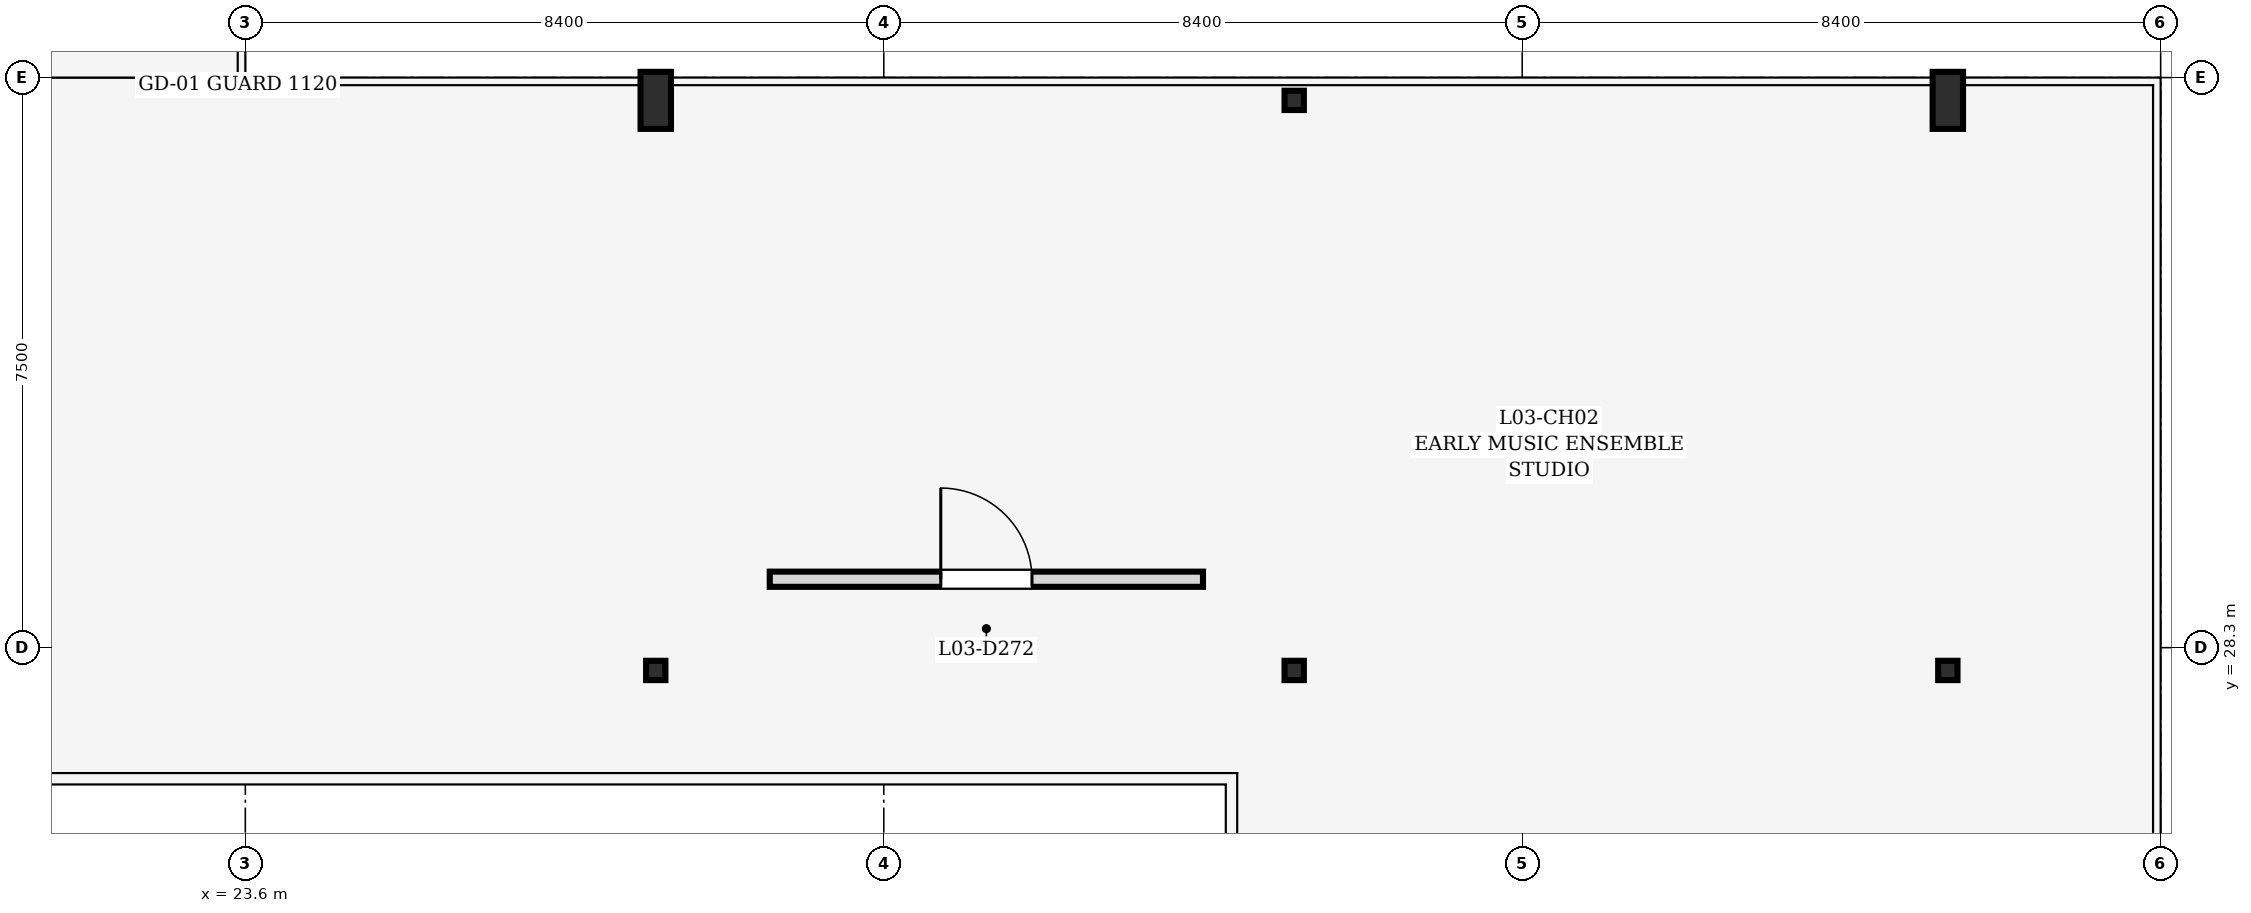
"""IFC4 building model, lengths in metres.
Left out: names, types, materials, properties, quantities, classifications, styles, units other than length and angle.
Written with IfcOpenShell. Run it as: python <this file> out.ifc"""

import sys

from ifc_helpers import new_model, si_unit, direction, frame, frame_2d, origin, origin_2d, place, context, subcontext, project, spatial, rectangle, i_section, extrude, element, fill, save


model = new_model("IFC4")
c1 = context("Model", 3, precision=1e-05, world=origin(), true_north=direction((0.0, 1.0)))
c2 = subcontext(c1, "Body", "Model", "MODEL_VIEW")
j1 = project(units=[si_unit("LENGTHUNIT", "METRE"), si_unit("PLANEANGLEUNIT", "RADIAN")], contexts=[c1])
p1 = place(None, origin())
s1 = spatial("IfcSite", under=j1, at=p1, CompositionType="ELEMENT")
p2 = place(p1, origin())
s2 = spatial("IfcBuilding", under=s1, at=p2, CompositionType="ELEMENT")
p3 = place(p2, frame((0.0, 0.0, 10.2)))
s3 = spatial("IfcBuildingStorey", under=s2, at=p3, CompositionType="ELEMENT", Elevation=10.2)
p4 = place(p3, frame((29.0, 28.0, 0.0), z_axis=(0.0, 0.0, 1.0), x_axis=(1.0, 0.0, 0.0)))
e1 = element("IfcColumn", 1, at=p4, inside=s3, PredefinedType="COLUMN", context=c2, shape_type="SweptSolid", body=[
    extrude(i_section(OverallWidth=0.254, OverallDepth=0.254, WebThickness=0.009, FlangeThickness=0.014, at=origin_2d()), origin(), (0.0, 0.0, 1.0), 4.5),
])
p5 = place(p3, frame((29.0, 35.5, 0.0), z_axis=(0.0, 0.0, 1.0), x_axis=(1.0, 0.0, 0.0)))
e2 = element("IfcColumn", 2, at=p5, inside=s3, PredefinedType="PILASTER", context=c2, shape_type="SweptSolid", body=[
    extrude(rectangle(XDim=0.4, YDim=0.75, at=origin_2d()), origin(), (0.0, 0.0, 1.0), 4.5),
])
for number, where, z_axis, x_axis in (
    (3, (37.4, 28.0, 0.0), (0.0, 0.0, 1.0), (1.0, 0.0, 0.0)),
    (4, (37.4, 35.5, 0.0), (0.0, 0.0, 1.0), (1.0, 0.0, 0.0)),
    (5, (46.0, 28.0, 0.0), (0.0, 0.0, 1.0), (1.0, 0.0, 0.0)),
):
    element("IfcColumn", number, at=place(p3, frame(where, z_axis=z_axis, x_axis=x_axis)), inside=s3, PredefinedType="COLUMN", context=c2, shape_type="SweptSolid", body=[
        extrude(i_section(OverallWidth=0.254, OverallDepth=0.254, WebThickness=0.009, FlangeThickness=0.014, at=origin_2d()), origin(), (0.0, 0.0, 1.0), 4.5),
    ])
p6 = place(p3, frame((46.0, 35.5, 0.0), z_axis=(0.0, 0.0, 1.0), x_axis=(1.0, 0.0, 0.0)))
e6 = element("IfcColumn", 6, at=p6, inside=s3, PredefinedType="PILASTER", context=c2, shape_type="SweptSolid", body=[
    extrude(rectangle(XDim=0.4, YDim=0.75, at=origin_2d()), origin(), (0.0, 0.0, 1.0), 4.5),
])
p7 = place(p3, frame((30.5, 29.2, 0.0), z_axis=(0.0, 0.0, 1.0), x_axis=(1.0, 0.0, 0.0)))
e7 = element("IfcWall", 7, at=p7, inside=s3, PredefinedType="PARTITIONING", context=c2, shape_type="SweptSolid", body=[
    extrude(rectangle(XDim=5.7, YDim=0.2, at=frame_2d((2.85, 0.0))), origin(), (0.0, 0.0, 1.0), 4.225),
])
p8 = place(p7, frame((2.25, 0.0, 0.0)))
e8 = element("IfcOpeningElement", 8, at=p8, cuts=e7, PredefinedType="OPENING", context=c2, shape_type="SweptSolid", body=[
    extrude(rectangle(XDim=1.2, YDim=2.3, at=frame_2d((0.6, 1.15))), frame((0.0, 0.112, 0.0), z_axis=(0.0, -1.0, 0.0), x_axis=(1.0, 0.0, 0.0)), (0.0, 0.0, 1.0), 0.224),
])
p9 = place(p8, origin())
e9 = element("IfcDoor", 9, at=p9, inside=s3, OperationType="SINGLE_SWING_LEFT", PredefinedType="DOOR", context=c2, shape_type="SweptSolid", body=[
    extrude(rectangle(XDim=1.2, YDim=2.3, at=frame_2d((0.6, 1.15))), frame((0.0, 0.025, 0.0), z_axis=(0.0, -1.0, 0.0), x_axis=(1.0, 0.0, 0.0)), (0.0, 0.0, 1.0), 0.05),
])
fill(e8, e9)
save(model, sys.argv[1])
